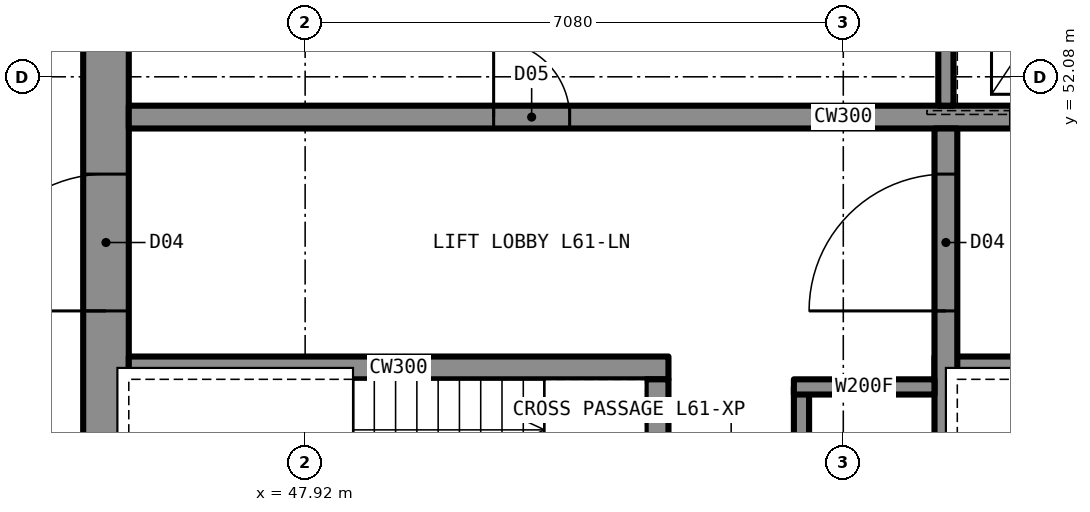
"""IFC4 building model, lengths in metres.
Left out: names, types, materials, properties, quantities, classifications, styles, units other than length and angle.
Written with IfcOpenShell. Run it as: python <this file> out.ifc"""

import sys

from ifc_helpers import new_model, si_unit, direction, frame, frame_2d, origin, place, context, subcontext, project, spatial, rectangle, extrude, element, fill, save


model = new_model("IFC4")
c1 = context("Model", 3, precision=1e-05, world=origin(), true_north=direction((0.0, 1.0)))
c2 = subcontext(c1, "Body", "Model", "MODEL_VIEW")
j1 = project(units=[si_unit("LENGTHUNIT", "METRE"), si_unit("PLANEANGLEUNIT", "RADIAN")], contexts=[c1])
p1 = place(None, origin())
s1 = spatial("IfcSite", under=j1, at=p1, CompositionType="ELEMENT")
p2 = place(p1, origin())
s2 = spatial("IfcBuilding", under=s1, at=p2, CompositionType="ELEMENT")
p3 = place(p2, frame((0.0, 0.0, 226.7)))
s3 = spatial("IfcBuildingStorey", under=s2, at=p3, CompositionType="ELEMENT", Elevation=226.7)
p4 = place(p3, frame((45.3, 35.6, 0.0), z_axis=(0.0, 0.0, 1.0), x_axis=(0.0, 1.0, 0.0)))
e1 = element("IfcWall", 1, at=p4, inside=s3, PredefinedType="SHEAR", context=c2, shape_type="SweptSolid", body=[
    extrude(rectangle(XDim=18.8, YDim=0.6, at=frame_2d((9.4, 0.0))), origin(), (0.0, 0.0, 1.0), 3.5),
])
p5 = place(p4, frame((13.4, 0.0, 0.0)))
e2 = element("IfcOpeningElement", 2, at=p5, cuts=e1, PredefinedType="OPENING", context=c2, shape_type="SweptSolid", body=[
    extrude(rectangle(XDim=1.8, YDim=2.2, at=frame_2d((0.9, 1.1))), frame((0.0, 0.31, 0.0), z_axis=(0.0, -1.0, 0.0), x_axis=(1.0, 0.0, 0.0)), (0.0, 0.0, 1.0), 0.62),
])
p6 = place(p4, frame((3.6, 0.0, 0.0)))
e3 = element("IfcOpeningElement", 3, at=p6, cuts=e1, PredefinedType="OPENING", context=c2, shape_type="SweptSolid", body=[
    extrude(rectangle(XDim=1.8, YDim=2.2, at=frame_2d((0.9, 1.1))), frame((0.0, 0.31, 0.0), z_axis=(0.0, -1.0, 0.0), x_axis=(1.0, 0.0, 0.0)), (0.0, 0.0, 1.0), 0.62),
])
p7 = place(p4, frame((6.4, 0.0, 0.0)))
e4 = element("IfcOpeningElement", 4, at=p7, cuts=e1, PredefinedType="OPENING", context=c2, shape_type="SweptSolid", body=[
    extrude(rectangle(XDim=1.2, YDim=2.2, at=frame_2d((0.6, 1.1))), frame((0.0, 0.31, 0.0), z_axis=(0.0, -1.0, 0.0), x_axis=(1.0, 0.0, 0.0)), (0.0, 0.0, 1.0), 0.62),
])
p8 = place(p3, frame((45.6, 51.55, 0.0), z_axis=(0.0, 0.0, 1.0), x_axis=(1.0, 0.0, 0.0)))
e5 = element("IfcWall", 5, at=p8, inside=s3, PredefinedType="SHEAR", context=c2, shape_type="SweptSolid", body=[
    extrude(rectangle(XDim=18.8, YDim=0.3, at=frame_2d((9.4, 0.0))), origin(), (0.0, 0.0, 1.0), 3.5),
])
p9 = place(p8, frame((4.8, 0.0, 0.0)))
e6 = element("IfcOpeningElement", 6, at=p9, cuts=e5, PredefinedType="OPENING", context=c2, shape_type="SweptSolid", body=[
    extrude(rectangle(XDim=1.0, YDim=2.1, at=frame_2d((0.5, 1.05))), frame((0.0, 0.16, 0.0), z_axis=(0.0, -1.0, 0.0), x_axis=(1.0, 0.0, 0.0)), (0.0, 0.0, 1.0), 0.32),
])
p10 = place(p8, frame((11.6, 0.0, 0.0)))
e7 = element("IfcOpeningElement", 7, at=p10, cuts=e5, PredefinedType="OPENING", context=c2, shape_type="SweptSolid", body=[
    extrude(rectangle(XDim=1.1, YDim=2.2, at=frame_2d((0.55, 1.1))), frame((0.0, 0.16, 0.0), z_axis=(0.0, -1.0, 0.0), x_axis=(1.0, 0.0, 0.0)), (0.0, 0.0, 1.0), 0.32),
])
p11 = place(p8, frame((14.3, 0.0, 0.0)))
e8 = element("IfcOpeningElement", 8, at=p11, cuts=e5, PredefinedType="OPENING", context=c2, shape_type="SweptSolid", body=[
    extrude(rectangle(XDim=1.1, YDim=2.2, at=frame_2d((0.55, 1.1))), frame((0.0, 0.16, 0.0), z_axis=(0.0, -1.0, 0.0), x_axis=(1.0, 0.0, 0.0)), (0.0, 0.0, 1.0), 0.32),
])
p12 = place(p3, frame((45.6, 48.25, 0.0), z_axis=(0.0, 0.0, 1.0), x_axis=(1.0, 0.0, 0.0)))
e9 = element("IfcWall", 9, at=p12, inside=s3, PredefinedType="SHEAR", context=c2, shape_type="SweptSolid", body=[
    extrude(rectangle(XDim=7.1, YDim=0.3, at=frame_2d((3.55, 0.0))), origin(), (0.0, 0.0, 1.0), 3.5),
])
p13 = place(p3, frame((56.2, 48.25, 0.0), z_axis=(0.0, 0.0, 1.0), x_axis=(1.0, 0.0, 0.0)))
e10 = element("IfcWall", 10, at=p13, inside=s3, PredefinedType="SHEAR", context=c2, shape_type="SweptSolid", body=[
    extrude(rectangle(XDim=8.2, YDim=0.3, at=frame_2d((4.1, 0.0))), origin(), (0.0, 0.0, 1.0), 3.5),
])
p14 = place(p13, frame((6.95, 0.0, 0.0)))
e11 = element("IfcOpeningElement", 11, at=p14, cuts=e10, PredefinedType="OPENING", context=c2, shape_type="SweptSolid", body=[
    extrude(rectangle(XDim=1.2, YDim=2.2, at=frame_2d((0.6, 1.1))), frame((0.0, 0.16, 0.0), z_axis=(0.0, -1.0, 0.0), x_axis=(1.0, 0.0, 0.0)), (0.0, 0.0, 1.0), 0.32),
])
p15 = place(p3, frame((52.55, 41.9, 0.0), z_axis=(0.0, 0.0, 1.0), x_axis=(0.0, 1.0, 0.0)))
e12 = element("IfcWall", 12, at=p15, inside=s3, PredefinedType="SHEAR", context=c2, shape_type="SweptSolid", body=[
    extrude(rectangle(XDim=6.2, YDim=0.3, at=frame_2d((3.1, 0.0))), origin(), (0.0, 0.0, 1.0), 3.5),
])
p16 = place(p15, frame((4.125, 0.0, 0.0)))
e13 = element("IfcOpeningElement", 13, at=p16, cuts=e12, PredefinedType="OPENING", context=c2, shape_type="SweptSolid", body=[
    extrude(rectangle(XDim=1.2, YDim=2.2, at=frame_2d((0.6, 1.1))), frame((0.0, 0.16, 0.0), z_axis=(0.0, -1.0, 0.0), x_axis=(1.0, 0.0, 0.0)), (0.0, 0.0, 1.0), 0.32),
])
p17 = place(p3, frame((56.35, 41.9, 0.0), z_axis=(0.0, 0.0, 1.0), x_axis=(0.0, 1.0, 0.0)))
e14 = element("IfcWall", 14, at=p17, inside=s3, PredefinedType="SHEAR", context=c2, shape_type="SweptSolid", body=[
    extrude(rectangle(XDim=9.5, YDim=0.3, at=frame_2d((4.75, 0.0))), origin(), (0.0, 0.0, 1.0), 3.5),
])
p18 = place(p17, frame((7.1, 0.0, 0.0)))
e15 = element("IfcOpeningElement", 15, at=p18, cuts=e14, PredefinedType="OPENING", context=c2, shape_type="SweptSolid", body=[
    extrude(rectangle(XDim=1.8, YDim=2.2, at=frame_2d((0.9, 1.1))), frame((0.0, 0.16, 0.0), z_axis=(0.0, -1.0, 0.0), x_axis=(1.0, 0.0, 0.0)), (0.0, 0.0, 1.0), 0.32),
])
p19 = place(p3, frame((54.45, 44.7, 0.0), z_axis=(0.0, 0.0, 1.0), x_axis=(0.0, 1.0, 0.0)))
e16 = element("IfcWall", 16, at=p19, inside=s3, PredefinedType="PARTITIONING", context=c2, shape_type="SweptSolid", body=[
    extrude(rectangle(XDim=3.3, YDim=0.2, at=frame_2d((1.65, 0.0))), origin(), (0.0, 0.0, 1.0), 3.33),
])
p20 = place(p19, frame((1.15, 0.0, 0.0)))
e17 = element("IfcOpeningElement", 17, at=p20, cuts=e16, PredefinedType="OPENING", context=c2, shape_type="SweptSolid", body=[
    extrude(rectangle(XDim=1.0, YDim=2.1, at=frame_2d((0.5, 1.05))), frame((0.0, 0.11, 0.0), z_axis=(0.0, -1.0, 0.0), x_axis=(1.0, 0.0, 0.0)), (0.0, 0.0, 1.0), 0.22),
])
p21 = place(p3, frame((54.35, 48.0, 0.0), z_axis=(0.0, 0.0, 1.0), x_axis=(1.0, 0.0, 0.0)))
e18 = element("IfcWall", 18, at=p21, inside=s3, PredefinedType="PARTITIONING", context=c2, shape_type="SweptSolid", body=[
    extrude(rectangle(XDim=1.85, YDim=0.2, at=frame_2d((0.925, 0.0))), origin(), (0.0, 0.0, 1.0), 3.33),
])
p22 = place(p3, frame((56.35, 51.7, 0.0), z_axis=(0.0, 0.0, 1.0), x_axis=(0.0, 1.0, 0.0)))
e19 = element("IfcWall", 19, at=p22, inside=s3, PredefinedType="PARTITIONING", context=c2, shape_type="SweptSolid", body=[
    extrude(rectangle(XDim=2.7, YDim=0.2, at=frame_2d((1.35, 0.0))), origin(), (0.0, 0.0, 1.0), 3.33),
])
p23 = place(p5, origin())
e20 = element("IfcDoor", 20, at=p23, inside=s3, OperationType="DOUBLE_DOOR_SINGLE_SWING", PredefinedType="DOOR", context=c2, shape_type="SweptSolid", body=[
    extrude(rectangle(XDim=1.8, YDim=2.2, at=frame_2d((0.9, 1.1))), frame((0.0, 0.025, 0.0), z_axis=(0.0, -1.0, 0.0), x_axis=(1.0, 0.0, 0.0)), (0.0, 0.0, 1.0), 0.05),
])
fill(e2, e20)
p24 = place(p18, origin())
e21 = element("IfcDoor", 21, at=p24, inside=s3, OperationType="DOUBLE_DOOR_SINGLE_SWING", PredefinedType="DOOR", context=c2, shape_type="SweptSolid", body=[
    extrude(rectangle(XDim=1.8, YDim=2.2, at=frame_2d((0.9, 1.1))), frame((0.0, 0.025, 0.0), z_axis=(0.0, -1.0, 0.0), x_axis=(1.0, 0.0, 0.0)), (0.0, 0.0, 1.0), 0.05),
])
fill(e15, e21)
p25 = place(p9, origin())
e22 = element("IfcDoor", 22, at=p25, inside=s3, OperationType="SINGLE_SWING_LEFT", PredefinedType="DOOR", context=c2, shape_type="SweptSolid", body=[
    extrude(rectangle(XDim=1.0, YDim=2.1, at=frame_2d((0.5, 1.05))), frame((0.0, 0.025, 0.0), z_axis=(0.0, -1.0, 0.0), x_axis=(1.0, 0.0, 0.0)), (0.0, 0.0, 1.0), 0.05),
])
fill(e6, e22)
save(model, sys.argv[1])
